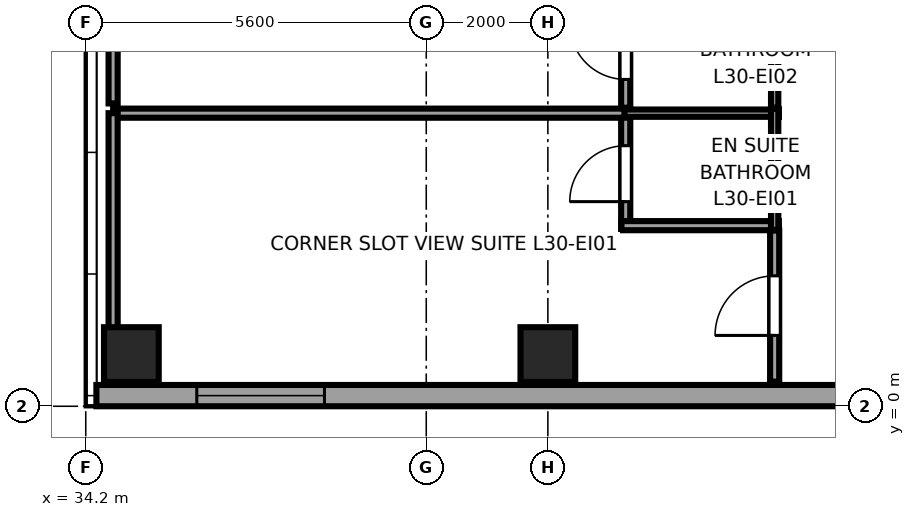
"""IFC4 building model, lengths in metres.
Left out: names, types, materials, properties, quantities, classifications, styles, units other than length and angle.
Written with IfcOpenShell. Run it as: python <this file> out.ifc"""

import sys

from ifc_helpers import new_model, si_unit, direction, frame, frame_2d, origin, origin_2d, place, context, subcontext, project, spatial, rectangle, extrude, source, transform, mapped, element, fill, save


model = new_model("IFC4")
c1 = context("Model", 3, precision=1e-05, world=origin(), true_north=direction((0.0, 1.0)))
c2 = subcontext(c1, "Body", "Model", "MODEL_VIEW")
j1 = project(units=[si_unit("LENGTHUNIT", "METRE"), si_unit("PLANEANGLEUNIT", "RADIAN")], contexts=[c1])
p1 = place(None, origin())
s1 = spatial("IfcSite", under=j1, at=p1, CompositionType="ELEMENT")
p2 = place(p1, origin())
s2 = spatial("IfcBuilding", under=s1, at=p2, CompositionType="ELEMENT")
p3 = place(p2, frame((0.0, 0.0, 118.65)))
s3 = spatial("IfcBuildingStorey", under=s2, at=p3, CompositionType="ELEMENT", Elevation=118.65)
m1 = source(origin(), c2, "Body", "SweptSolid", [
    extrude(rectangle(XDim=0.9, YDim=0.9, at=origin_2d()), origin(), (0.0, 0.0, 1.0), 3.55),
])
for number, where, z_axis, x_axis in (
    (1, (34.95, 0.85, 0.0), (0.0, 0.0, 1.0), (1.0, 0.0, 0.0)),
    (2, (41.8, 0.85, 0.0), (0.0, 0.0, 1.0), (1.0, 0.0, 0.0)),
):
    element("IfcColumn", number, at=place(p3, frame(where, z_axis=z_axis, x_axis=x_axis)), inside=s3, PredefinedType="COLUMN", context=c2, shape_type="MappedRepresentation", body=[
        mapped(m1, transform((0.0, 0.0, 0.0), x_axis=(1.0, 0.0, 0.0), y_axis=(0.0, 1.0, 0.0), z_axis=(0.0, 0.0, 1.0), scale=1.0)),
    ])
p4 = place(p3, frame((34.375, 0.175, 0.0), z_axis=(0.0, 0.0, 1.0), x_axis=(1.0, 0.0, 0.0)))
e3 = element("IfcWall", 3, at=p4, inside=s3, PredefinedType="SOLIDWALL", context=c2, shape_type="SweptSolid", body=[
    extrude(rectangle(XDim=18.008, YDim=0.35, at=frame_2d((9.004, 0.0))), origin(), (0.0, 0.0, 1.0), 3.37),
])
p5 = place(p4, frame((1.651, 0.0, 0.68)))
e4 = element("IfcOpeningElement", 4, at=p5, cuts=e3, PredefinedType="OPENING", context=c2, shape_type="SweptSolid", body=[
    extrude(rectangle(XDim=2.1, YDim=1.9, at=frame_2d((1.05, 0.95))), frame((0.0, 0.185, 0.0), z_axis=(0.0, -1.0, 0.0), x_axis=(1.0, 0.0, 0.0)), (0.0, 0.0, 1.0), 0.37),
])
p6 = place(p3, frame((43.08, 2.9, 0.0), z_axis=(0.0, 0.0, 1.0), x_axis=(0.0, 1.0, 0.0)))
e5 = element("IfcWall", 5, at=p6, inside=s3, PredefinedType="PARTITIONING", context=c2, shape_type="SweptSolid", body=[
    extrude(rectangle(XDim=1.99, YDim=0.15, at=frame_2d((0.995, 0.0))), origin(), (0.0, 0.0, 1.0), 3.37),
])
p7 = place(p6, frame((0.465, 0.0, 0.0)))
e6 = element("IfcOpeningElement", 6, at=p7, cuts=e5, PredefinedType="OPENING", context=c2, shape_type="SweptSolid", body=[
    extrude(rectangle(XDim=0.92, YDim=2.01, at=frame_2d((0.46, 1.005))), frame((0.0, 0.085, 0.0), z_axis=(0.0, -1.0, 0.0), x_axis=(1.0, 0.0, 0.0)), (0.0, 0.0, 1.0), 0.17),
])
p8 = place(p3, frame((43.01, 2.97, 0.0), z_axis=(0.0, 0.0, 1.0), x_axis=(1.0, 0.0, 0.0)))
e7 = element("IfcWall", 7, at=p8, inside=s3, PredefinedType="PARTITIONING", context=c2, shape_type="SweptSolid", body=[
    extrude(rectangle(XDim=2.59, YDim=0.15, at=frame_2d((1.295, 0.0))), origin(), (0.0, 0.0, 1.0), 3.37),
])
p9 = place(p3, frame((43.01, 4.82, 0.0), z_axis=(0.0, 0.0, 1.0), x_axis=(1.0, 0.0, 0.0)))
e8 = element("IfcWall", 8, at=p9, inside=s3, PredefinedType="PLUMBINGWALL", context=c2, shape_type="SweptSolid", body=[
    extrude(rectangle(XDim=2.59, YDim=0.12, at=frame_2d((1.295, 0.0))), origin(), (0.0, 0.0, 1.0), 3.37),
])
p10 = place(p3, frame((45.53, 2.9, 0.0), z_axis=(0.0, 0.0, 1.0), x_axis=(0.0, 1.0, 0.0)))
e9 = element("IfcWall", 9, at=p10, inside=s3, PredefinedType="PLUMBINGWALL", context=c2, shape_type="SweptSolid", body=[
    extrude(rectangle(XDim=1.99, YDim=0.12, at=frame_2d((0.995, 0.0))), origin(), (0.0, 0.0, 1.0), 3.37),
])
p11 = place(p3, frame((43.08, 4.91, 0.0), z_axis=(0.0, 0.0, 1.0), x_axis=(0.0, 1.0, 0.0)))
e10 = element("IfcWall", 10, at=p11, inside=s3, PredefinedType="PARTITIONING", context=c2, shape_type="SweptSolid", body=[
    extrude(rectangle(XDim=1.99, YDim=0.15, at=frame_2d((0.995, 0.0))), origin(), (0.0, 0.0, 1.0), 3.37),
])
p12 = place(p11, frame((0.465, 0.0, 0.0)))
e11 = element("IfcOpeningElement", 11, at=p12, cuts=e10, PredefinedType="OPENING", context=c2, shape_type="SweptSolid", body=[
    extrude(rectangle(XDim=0.92, YDim=2.01, at=frame_2d((0.46, 1.005))), frame((0.0, 0.085, 0.0), z_axis=(0.0, -1.0, 0.0), x_axis=(1.0, 0.0, 0.0)), (0.0, 0.0, 1.0), 0.17),
])
p13 = place(p3, frame((45.53, 4.91, 0.0), z_axis=(0.0, 0.0, 1.0), x_axis=(0.0, 1.0, 0.0)))
e12 = element("IfcWall", 12, at=p13, inside=s3, PredefinedType="PLUMBINGWALL", context=c2, shape_type="SweptSolid", body=[
    extrude(rectangle(XDim=1.99, YDim=0.12, at=frame_2d((0.995, 0.0))), origin(), (0.0, 0.0, 1.0), 3.37),
])
p14 = place(p3, frame((45.53, 0.405, 0.0), z_axis=(0.0, 0.0, 1.0), x_axis=(0.0, 1.0, 0.0)))
e13 = element("IfcWall", 13, at=p14, inside=s3, PredefinedType="PARTITIONING", context=c2, shape_type="SweptSolid", body=[
    extrude(rectangle(XDim=2.485, YDim=0.15, at=frame_2d((1.242, 0.0))), origin(), (0.0, 0.0, 1.0), 3.37),
])
p15 = place(p14, frame((0.76, 0.0, 0.0)))
e14 = element("IfcOpeningElement", 14, at=p15, cuts=e13, PredefinedType="OPENING", context=c2, shape_type="SweptSolid", body=[
    extrude(rectangle(XDim=0.98, YDim=2.12, at=frame_2d((0.49, 1.06))), frame((0.0, 0.085, 0.0), z_axis=(0.0, -1.0, 0.0), x_axis=(1.0, 0.0, 0.0)), (0.0, 0.0, 1.0), 0.17),
])
p16 = place(p3, frame((34.65, 4.82, 0.0), z_axis=(0.0, 0.0, 1.0), x_axis=(1.0, 0.0, 0.0)))
e15 = element("IfcWall", 15, at=p16, inside=s3, PredefinedType="PARTITIONING", context=c2, shape_type="SweptSolid", body=[
    extrude(rectangle(XDim=8.41, YDim=0.15, at=frame_2d((4.205, 0.0))), origin(), (0.0, 0.0, 1.0), 3.37),
])
p17 = place(p3, frame((34.65, 0.405, 0.0), z_axis=(0.0, 0.0, 1.0), x_axis=(0.0, 1.0, 0.0)))
e16 = element("IfcWall", 16, at=p17, inside=s3, PredefinedType="PARTITIONING", context=c2, shape_type="SweptSolid", body=[
    extrude(rectangle(XDim=4.415, YDim=0.15, at=frame_2d((2.208, 0.0))), origin(), (0.0, 0.0, 1.0), 3.37),
])
p18 = place(p3, frame((34.65, 4.98, 0.0), z_axis=(0.0, 0.0, 1.0), x_axis=(0.0, 1.0, 0.0)))
e17 = element("IfcWall", 17, at=p18, inside=s3, PredefinedType="PARTITIONING", context=c2, shape_type="SweptSolid", body=[
    extrude(rectangle(XDim=4.74, YDim=0.15, at=frame_2d((2.37, 0.0))), origin(), (0.0, 0.0, 1.0), 3.37),
])
m2 = source(origin(), c2, "Body", "SweptSolid", [
    extrude(rectangle(XDim=2.1, YDim=1.9, at=frame_2d((1.05, 0.95))), frame((0.0, 0.09, 0.0), z_axis=(0.0, -1.0, 0.0), x_axis=(1.0, 0.0, 0.0)), (0.0, 0.0, 1.0), 0.06),
])
p19 = place(p5, origin())
e18 = element("IfcWindow", 18, at=p19, inside=s3, PartitioningType="TRIPLE_PANEL_HORIZONTAL", PredefinedType="WINDOW", context=c2, shape_type="MappedRepresentation", body=[
    mapped(m2, transform((0.0, 0.0, 0.0), x_axis=(1.0, 0.0, 0.0), y_axis=(0.0, 1.0, 0.0), z_axis=(0.0, 0.0, 1.0), scale=1.0)),
])
fill(e4, e18)
m3 = source(origin(), c2, "Body", "SweptSolid", [
    extrude(rectangle(XDim=0.92, YDim=2.01, at=frame_2d((0.46, 1.005))), frame((0.0, 0.025, 0.0), z_axis=(0.0, -1.0, 0.0), x_axis=(1.0, 0.0, 0.0)), (0.0, 0.0, 1.0), 0.05),
])
p20 = place(p7, origin())
e19 = element("IfcDoor", 19, at=p20, inside=s3, OperationType="SINGLE_SWING_LEFT", PredefinedType="DOOR", context=c2, shape_type="MappedRepresentation", body=[
    mapped(m3, transform((0.0, 0.0, 0.0), x_axis=(1.0, 0.0, 0.0), y_axis=(0.0, 1.0, 0.0), z_axis=(0.0, 0.0, 1.0), scale=1.0)),
])
fill(e6, e19)
p21 = place(p12, origin())
e20 = element("IfcDoor", 20, at=p21, inside=s3, OperationType="SINGLE_SWING_RIGHT", PredefinedType="DOOR", context=c2, shape_type="MappedRepresentation", body=[
    mapped(m3, transform((0.0, 0.0, 0.0), x_axis=(1.0, 0.0, 0.0), y_axis=(0.0, 1.0, 0.0), z_axis=(0.0, 0.0, 1.0), scale=1.0)),
])
fill(e11, e20)
m4 = source(origin(), c2, "Body", "SweptSolid", [
    extrude(rectangle(XDim=0.98, YDim=2.12, at=frame_2d((0.49, 1.06))), frame((0.0, 0.025, 0.0), z_axis=(0.0, -1.0, 0.0), x_axis=(1.0, 0.0, 0.0)), (0.0, 0.0, 1.0), 0.05),
])
p22 = place(p15, origin())
e21 = element("IfcDoor", 21, at=p22, inside=s3, OperationType="SINGLE_SWING_LEFT", PredefinedType="DOOR", context=c2, shape_type="MappedRepresentation", body=[
    mapped(m4, transform((0.0, 0.0, 0.0), x_axis=(1.0, 0.0, 0.0), y_axis=(0.0, 1.0, 0.0), z_axis=(0.0, 0.0, 1.0), scale=1.0)),
])
fill(e14, e21)
save(model, sys.argv[1])
